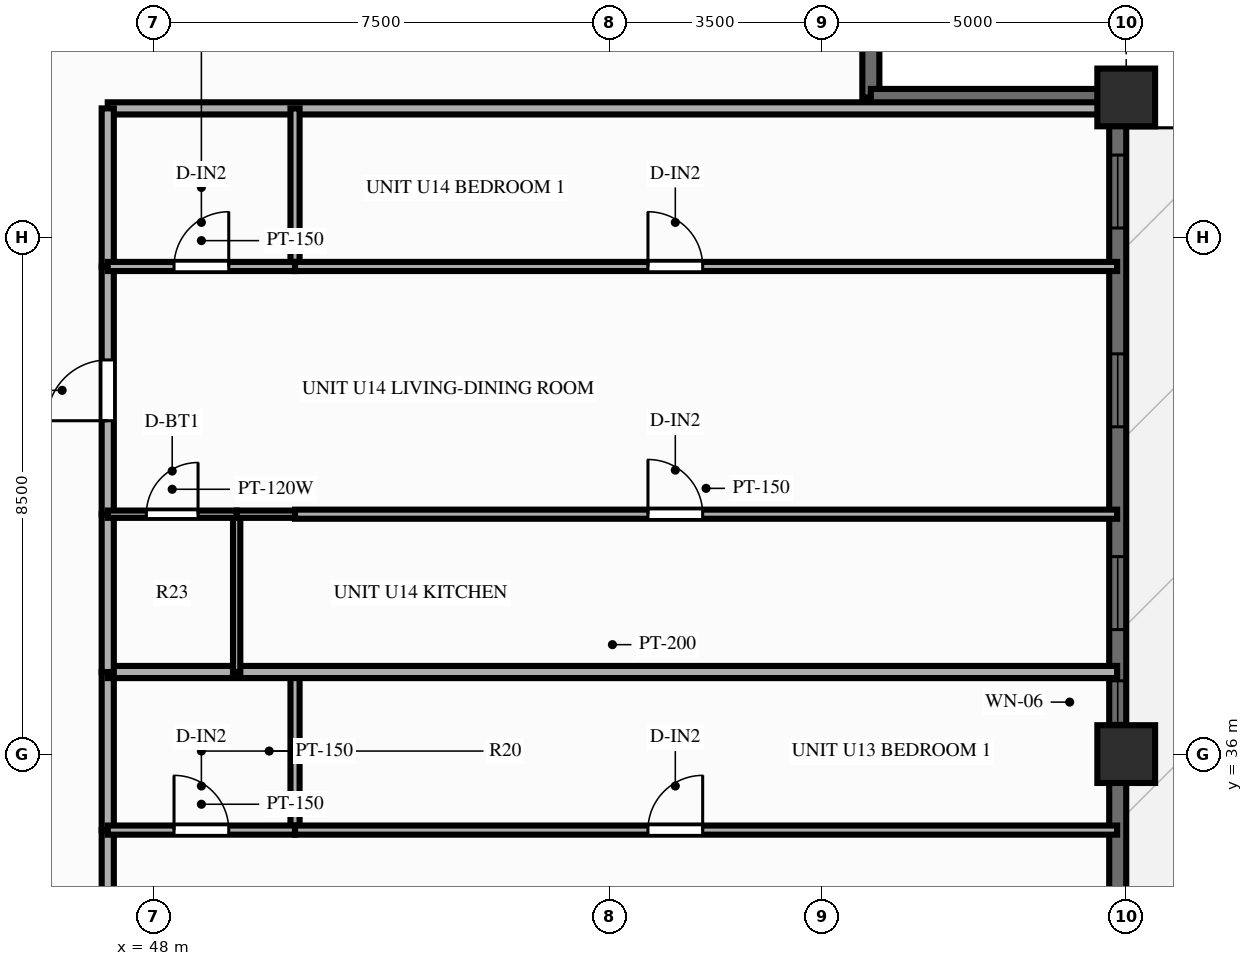
"""IFC4 building model, lengths in metres.
Left out: names, types, materials, properties, quantities, classifications, styles, units other than length and angle.
Written with IfcOpenShell. Run it as: python <this file> out.ifc"""

import sys

from ifc_helpers import new_model, si_unit, direction, frame, frame_2d, origin, origin_2d, place, context, subcontext, project, spatial, rectangle, extrude, source, transform, mapped, element, fill, save


model = new_model("IFC4")
c1 = context("Model", 3, precision=1e-05, world=origin(), true_north=direction((0.0, 1.0)))
c2 = subcontext(c1, "Body", "Model", "MODEL_VIEW")
j1 = project(units=[si_unit("LENGTHUNIT", "METRE"), si_unit("PLANEANGLEUNIT", "RADIAN")], contexts=[c1])
p1 = place(None, origin())
s1 = spatial("IfcSite", under=j1, at=p1, CompositionType="ELEMENT")
p2 = place(p1, origin())
s2 = spatial("IfcBuilding", under=s1, at=p2, CompositionType="ELEMENT")
p3 = place(p2, frame((0.0, 0.0, 119.85)))
s3 = spatial("IfcBuildingStorey", under=s2, at=p3, CompositionType="ELEMENT", Elevation=119.85)
m1 = source(origin(), c2, "Body", "SweptSolid", [
    extrude(rectangle(XDim=0.95, YDim=0.95, at=origin_2d()), origin(), (0.0, 0.0, 1.0), 3.0),
])
for number, where, z_axis, x_axis in (
    (1, (64.0, 36.0, 0.0), (0.0, 0.0, 1.0), (1.0, 0.0, 0.0)),
    (2, (64.0, 46.8, 0.0), (0.0, 0.0, 1.0), (1.0, 0.0, 0.0)),
):
    element("IfcColumn", number, at=place(p3, frame(where, z_axis=z_axis, x_axis=x_axis)), inside=s3, PredefinedType="COLUMN", context=c2, shape_type="MappedRepresentation", body=[
        mapped(m1, transform((0.0, 0.0, 0.0), scale=1.0)),
    ])
p4 = place(p3, frame((63.86, 7.2, 0.0), z_axis=(0.0, 0.0, 1.0), x_axis=(0.0, 1.0, 0.0)))
e3 = element("IfcWall", 3, at=p4, inside=s3, PredefinedType="SOLIDWALL", context=c2, shape_type="SweptSolid", body=[
    extrude(rectangle(XDim=39.6, YDim=0.28, at=frame_2d((19.8, 0.0))), origin(), (0.0, 0.0, 1.0), 2.28),
])
p5 = place(p4, frame((1.56, 0.0, 0.25)))
e4 = element("IfcOpeningElement", 4, at=p5, cuts=e3, PredefinedType="OPENING", context=c2, shape_type="SweptSolid", body=[
    extrude(rectangle(XDim=1.2, YDim=1.5, at=frame_2d((0.6, 0.75))), frame((0.0, 0.152, 0.0), z_axis=(0.0, -1.0, 0.0), x_axis=(1.0, 0.0, 0.0)), (0.0, 0.0, 1.0), 0.304),
])
p6 = place(p4, frame((4.829, 0.0, 0.25)))
e5 = element("IfcOpeningElement", 5, at=p6, cuts=e3, PredefinedType="OPENING", context=c2, shape_type="SweptSolid", body=[
    extrude(rectangle(XDim=1.2, YDim=1.5, at=frame_2d((0.6, 0.75))), frame((0.0, 0.152, 0.0), z_axis=(0.0, -1.0, 0.0), x_axis=(1.0, 0.0, 0.0)), (0.0, 0.0, 1.0), 0.304),
])
p7 = place(p4, frame((7.567, 0.0, 0.25)))
e6 = element("IfcOpeningElement", 6, at=p7, cuts=e3, PredefinedType="OPENING", context=c2, shape_type="SweptSolid", body=[
    extrude(rectangle(XDim=1.2, YDim=1.5, at=frame_2d((0.6, 0.75))), frame((0.0, 0.152, 0.0), z_axis=(0.0, -1.0, 0.0), x_axis=(1.0, 0.0, 0.0)), (0.0, 0.0, 1.0), 0.304),
])
p8 = place(p4, frame((11.476, 0.0, 0.25)))
e7 = element("IfcOpeningElement", 7, at=p8, cuts=e3, PredefinedType="OPENING", context=c2, shape_type="SweptSolid", body=[
    extrude(rectangle(XDim=0.95, YDim=1.5, at=frame_2d((0.475, 0.75))), frame((0.0, 0.152, 0.0), z_axis=(0.0, -1.0, 0.0), x_axis=(1.0, 0.0, 0.0)), (0.0, 0.0, 1.0), 0.304),
])
p9 = place(p4, frame((13.552, 0.0, 0.25)))
e8 = element("IfcOpeningElement", 8, at=p9, cuts=e3, PredefinedType="OPENING", context=c2, shape_type="SweptSolid", body=[
    extrude(rectangle(XDim=1.2, YDim=1.5, at=frame_2d((0.6, 0.75))), frame((0.0, 0.152, 0.0), z_axis=(0.0, -1.0, 0.0), x_axis=(1.0, 0.0, 0.0)), (0.0, 0.0, 1.0), 0.304),
])
p10 = place(p4, frame((16.518, 0.0, 0.25)))
e9 = element("IfcOpeningElement", 9, at=p10, cuts=e3, PredefinedType="OPENING", context=c2, shape_type="SweptSolid", body=[
    extrude(rectangle(XDim=1.2, YDim=1.5, at=frame_2d((0.6, 0.75))), frame((0.0, 0.152, 0.0), z_axis=(0.0, -1.0, 0.0), x_axis=(1.0, 0.0, 0.0)), (0.0, 0.0, 1.0), 0.304),
])
p11 = place(p4, frame((19.2, 0.0, 0.25)))
e10 = element("IfcOpeningElement", 10, at=p11, cuts=e3, PredefinedType="OPENING", context=c2, shape_type="SweptSolid", body=[
    extrude(rectangle(XDim=1.2, YDim=1.5, at=frame_2d((0.6, 0.75))), frame((0.0, 0.152, 0.0), z_axis=(0.0, -1.0, 0.0), x_axis=(1.0, 0.0, 0.0)), (0.0, 0.0, 1.0), 0.304),
])
p12 = place(p4, frame((21.578, 0.0, 0.25)))
e11 = element("IfcOpeningElement", 11, at=p12, cuts=e3, PredefinedType="OPENING", context=c2, shape_type="SweptSolid", body=[
    extrude(rectangle(XDim=1.2, YDim=1.5, at=frame_2d((0.6, 0.75))), frame((0.0, 0.152, 0.0), z_axis=(0.0, -1.0, 0.0), x_axis=(1.0, 0.0, 0.0)), (0.0, 0.0, 1.0), 0.304),
])
p13 = place(p4, frame((26.313, 0.0, 0.0), z_axis=(0.0, 0.0, 1.0), x_axis=(-1.0, 0.0, 0.0)))
e12 = element("IfcOpeningElement", 12, at=p13, cuts=e3, PredefinedType="OPENING", context=c2, shape_type="SweptSolid", body=[
    extrude(rectangle(XDim=1.6, YDim=2.15, at=frame_2d((0.8, 1.075))), frame((0.0, 0.152, 0.0), z_axis=(0.0, -1.0, 0.0), x_axis=(1.0, 0.0, 0.0)), (0.0, 0.0, 1.0), 0.304),
])
p14 = place(p4, frame((29.305, 0.0, 0.25)))
e13 = element("IfcOpeningElement", 13, at=p14, cuts=e3, PredefinedType="OPENING", context=c2, shape_type="SweptSolid", body=[
    extrude(rectangle(XDim=0.7, YDim=1.5, at=frame_2d((0.35, 0.75))), frame((0.0, 0.152, 0.0), z_axis=(0.0, -1.0, 0.0), x_axis=(1.0, 0.0, 0.0)), (0.0, 0.0, 1.0), 0.304),
])
p15 = place(p4, frame((30.848, 0.0, 0.25)))
e14 = element("IfcOpeningElement", 14, at=p15, cuts=e3, PredefinedType="OPENING", context=c2, shape_type="SweptSolid", body=[
    extrude(rectangle(XDim=1.2, YDim=1.5, at=frame_2d((0.6, 0.75))), frame((0.0, 0.152, 0.0), z_axis=(0.0, -1.0, 0.0), x_axis=(1.0, 0.0, 0.0)), (0.0, 0.0, 1.0), 0.304),
])
p16 = place(p4, frame((34.183, 0.0, 0.25)))
e15 = element("IfcOpeningElement", 15, at=p16, cuts=e3, PredefinedType="OPENING", context=c2, shape_type="SweptSolid", body=[
    extrude(rectangle(XDim=1.2, YDim=1.5, at=frame_2d((0.6, 0.75))), frame((0.0, 0.152, 0.0), z_axis=(0.0, -1.0, 0.0), x_axis=(1.0, 0.0, 0.0)), (0.0, 0.0, 1.0), 0.304),
])
p17 = place(p4, frame((37.452, 0.0, 0.25)))
e16 = element("IfcOpeningElement", 16, at=p17, cuts=e3, PredefinedType="OPENING", context=c2, shape_type="SweptSolid", body=[
    extrude(rectangle(XDim=1.2, YDim=1.5, at=frame_2d((0.6, 0.75))), frame((0.0, 0.152, 0.0), z_axis=(0.0, -1.0, 0.0), x_axis=(1.0, 0.0, 0.0)), (0.0, 0.0, 1.0), 0.304),
])
for number, where, z_axis, x_axis in (
    (17, (59.8, 46.8, 0.0), (0.0, 0.0, 1.0), (0.0, 1.0, 0.0)),
    (18, (59.8, 46.8, 0.0), (0.0, 0.0, 1.0), (1.0, 0.0, 0.0)),
):
    element("IfcWall", number, at=place(p3, frame(where, z_axis=z_axis, x_axis=x_axis)), inside=s3, PredefinedType="SOLIDWALL", context=c2, shape_type="SweptSolid", body=[
        extrude(rectangle(XDim=4.12, YDim=0.28, at=frame_2d((2.06, 0.0))), origin(), (0.0, 0.0, 1.0), 2.28),
    ])
p18 = place(p3, frame((47.25, 46.62, 0.0), z_axis=(0.0, 0.0, 1.0), x_axis=(1.0, 0.0, 0.0)))
e19 = element("IfcWall", 19, at=p18, inside=s3, PredefinedType="PARTITIONING", context=c2, shape_type="SweptSolid", body=[
    extrude(rectangle(XDim=16.6, YDim=0.2, at=frame_2d((8.3, 0.0))), origin(), (0.0, 0.0, 1.0), 2.79),
])
p19 = place(p3, frame((47.25, 30.676, 0.0), z_axis=(0.0, 0.0, 1.0), x_axis=(0.0, 1.0, 0.0)))
e20 = element("IfcWall", 20, at=p19, inside=s3, PredefinedType="PARTITIONING", context=c2, shape_type="SweptSolid", body=[
    extrude(rectangle(XDim=4.074, YDim=0.2, at=frame_2d((2.037, 0.0))), origin(), (0.0, 0.0, 1.0), 2.79),
])
p20 = place(p19, frame((1.537, 0.0, 0.0)))
e21 = element("IfcOpeningElement", 21, at=p20, cuts=e20, PredefinedType="OPENING", context=c2, shape_type="SweptSolid", body=[
    extrude(rectangle(XDim=1.0, YDim=2.15, at=frame_2d((0.5, 1.075))), frame((0.0, 0.112, 0.0), z_axis=(0.0, -1.0, 0.0), x_axis=(1.0, 0.0, 0.0)), (0.0, 0.0, 1.0), 0.224),
])
p21 = place(p3, frame((47.25, 34.75, 0.0), z_axis=(0.0, 0.0, 1.0), x_axis=(0.0, 1.0, 0.0)))
e22 = element("IfcWall", 22, at=p21, inside=s3, PredefinedType="PARTITIONING", context=c2, shape_type="SweptSolid", body=[
    extrude(rectangle(XDim=2.6, YDim=0.2, at=frame_2d((1.3, 0.0))), origin(), (0.0, 0.0, 1.0), 2.79),
])
p22 = place(p3, frame((50.33, 34.75, 0.0), z_axis=(0.0, 0.0, 1.0), x_axis=(0.0, 1.0, 0.0)))
e23 = element("IfcWall", 23, at=p22, inside=s3, PredefinedType="PARTITIONING", context=c2, shape_type="SweptSolid", body=[
    extrude(rectangle(XDim=2.6, YDim=0.15, at=frame_2d((1.3, 0.0))), origin(), (0.0, 0.0, 1.0), 2.79),
])
p23 = place(p3, frame((47.25, 34.75, 0.0), z_axis=(0.0, 0.0, 1.0), x_axis=(1.0, 0.0, 0.0)))
e24 = element("IfcWall", 24, at=p23, inside=s3, PredefinedType="PARTITIONING", context=c2, shape_type="SweptSolid", body=[
    extrude(rectangle(XDim=3.08, YDim=0.15, at=frame_2d((1.54, 0.0))), origin(), (0.0, 0.0, 1.0), 2.79),
])
p24 = place(p23, frame((1.09, 0.0, 0.0)))
e25 = element("IfcOpeningElement", 25, at=p24, cuts=e24, PredefinedType="OPENING", context=c2, shape_type="SweptSolid", body=[
    extrude(rectangle(XDim=0.9, YDim=2.1, at=frame_2d((0.45, 1.05))), frame((0.0, 0.087, 0.0), z_axis=(0.0, -1.0, 0.0), x_axis=(1.0, 0.0, 0.0)), (0.0, 0.0, 1.0), 0.174),
])
p25 = place(p3, frame((50.33, 34.75, 0.0), z_axis=(0.0, 0.0, 1.0), x_axis=(1.0, 0.0, 0.0)))
e26 = element("IfcWall", 26, at=p25, inside=s3, PredefinedType="PARTITIONING", context=c2, shape_type="SweptSolid", body=[
    extrude(rectangle(XDim=13.52, YDim=0.15, at=frame_2d((6.76, 0.0))), origin(), (0.0, 0.0, 1.0), 2.79),
])
p26 = place(p25, frame((5.804, 0.0, 0.0)))
e27 = element("IfcOpeningElement", 27, at=p26, cuts=e26, PredefinedType="OPENING", context=c2, shape_type="SweptSolid", body=[
    extrude(rectangle(XDim=0.9, YDim=2.1, at=frame_2d((0.45, 1.05))), frame((0.0, 0.087, 0.0), z_axis=(0.0, -1.0, 0.0), x_axis=(1.0, 0.0, 0.0)), (0.0, 0.0, 1.0), 0.174),
])
p27 = place(p3, frame((47.25, 37.35, 0.0), z_axis=(0.0, 0.0, 1.0), x_axis=(1.0, 0.0, 0.0)))
e28 = element("IfcWall", 28, at=p27, inside=s3, PredefinedType="PARTITIONING", context=c2, shape_type="SweptSolid", body=[
    extrude(rectangle(XDim=16.6, YDim=0.2, at=frame_2d((8.3, 0.0))), origin(), (0.0, 0.0, 1.0), 2.79),
])
p28 = place(p3, frame((47.25, 37.35, 0.0), z_axis=(0.0, 0.0, 1.0), x_axis=(0.0, 1.0, 0.0)))
e29 = element("IfcWall", 29, at=p28, inside=s3, PredefinedType="PARTITIONING", context=c2, shape_type="SweptSolid", body=[
    extrude(rectangle(XDim=2.595, YDim=0.2, at=frame_2d((1.298, 0.0))), origin(), (0.0, 0.0, 1.0), 2.79),
])
p29 = place(p3, frame((47.25, 39.946, 0.0), z_axis=(0.0, 0.0, 1.0), x_axis=(0.0, 1.0, 0.0)))
e30 = element("IfcWall", 30, at=p29, inside=s3, PredefinedType="PARTITIONING", context=c2, shape_type="SweptSolid", body=[
    extrude(rectangle(XDim=4.074, YDim=0.2, at=frame_2d((2.037, 0.0))), origin(), (0.0, 0.0, 1.0), 2.79),
])
p30 = place(p29, frame((1.537, 0.0, 0.0)))
e31 = element("IfcOpeningElement", 31, at=p30, cuts=e30, PredefinedType="OPENING", context=c2, shape_type="SweptSolid", body=[
    extrude(rectangle(XDim=1.0, YDim=2.15, at=frame_2d((0.5, 1.075))), frame((0.0, 0.112, 0.0), z_axis=(0.0, -1.0, 0.0), x_axis=(1.0, 0.0, 0.0)), (0.0, 0.0, 1.0), 0.224),
])
p31 = place(p3, frame((47.25, 44.02, 0.0), z_axis=(0.0, 0.0, 1.0), x_axis=(0.0, 1.0, 0.0)))
e32 = element("IfcWall", 32, at=p31, inside=s3, PredefinedType="PARTITIONING", context=c2, shape_type="SweptSolid", body=[
    extrude(rectangle(XDim=2.6, YDim=0.2, at=frame_2d((1.3, 0.0))), origin(), (0.0, 0.0, 1.0), 2.79),
])
p32 = place(p3, frame((49.37, 37.35, 0.0), z_axis=(0.0, 0.0, 1.0), x_axis=(0.0, 1.0, 0.0)))
e33 = element("IfcWall", 33, at=p32, inside=s3, PredefinedType="PARTITIONING", context=c2, shape_type="SweptSolid", body=[
    extrude(rectangle(XDim=2.595, YDim=0.12, at=frame_2d((1.298, 0.0))), origin(), (0.0, 0.0, 1.0), 2.79),
])
p33 = place(p3, frame((50.33, 44.02, 0.0), z_axis=(0.0, 0.0, 1.0), x_axis=(0.0, 1.0, 0.0)))
e34 = element("IfcWall", 34, at=p33, inside=s3, PredefinedType="PARTITIONING", context=c2, shape_type="SweptSolid", body=[
    extrude(rectangle(XDim=2.6, YDim=0.15, at=frame_2d((1.3, 0.0))), origin(), (0.0, 0.0, 1.0), 2.79),
])
p34 = place(p3, frame((47.25, 39.946, 0.0), z_axis=(0.0, 0.0, 1.0), x_axis=(1.0, 0.0, 0.0)))
e35 = element("IfcWall", 35, at=p34, inside=s3, PredefinedType="PARTITIONING", context=c2, shape_type="SweptSolid", body=[
    extrude(rectangle(XDim=2.12, YDim=0.12, at=frame_2d((1.06, 0.0))), origin(), (0.0, 0.0, 1.0), 2.79),
])
p35 = place(p34, frame((0.635, 0.0, 0.0)))
e36 = element("IfcOpeningElement", 36, at=p35, cuts=e35, PredefinedType="OPENING", context=c2, shape_type="SweptSolid", body=[
    extrude(rectangle(XDim=0.85, YDim=2.05, at=frame_2d((0.425, 1.025))), frame((0.0, 0.072, 0.0), z_axis=(0.0, -1.0, 0.0), x_axis=(1.0, 0.0, 0.0)), (0.0, 0.0, 1.0), 0.144),
])
p36 = place(p3, frame((49.37, 39.946, 0.0), z_axis=(0.0, 0.0, 1.0), x_axis=(1.0, 0.0, 0.0)))
e37 = element("IfcWall", 37, at=p36, inside=s3, PredefinedType="PARTITIONING", context=c2, shape_type="SweptSolid", body=[
    extrude(rectangle(XDim=0.96, YDim=0.12, at=frame_2d((0.48, 0.0))), origin(), (0.0, 0.0, 1.0), 2.79),
])
p37 = place(p3, frame((50.33, 39.946, 0.0), z_axis=(0.0, 0.0, 1.0), x_axis=(1.0, 0.0, 0.0)))
e38 = element("IfcWall", 38, at=p37, inside=s3, PredefinedType="PARTITIONING", context=c2, shape_type="SweptSolid", body=[
    extrude(rectangle(XDim=13.52, YDim=0.15, at=frame_2d((6.76, 0.0))), origin(), (0.0, 0.0, 1.0), 2.79),
])
p38 = place(p37, frame((5.804, 0.0, 0.0)))
e39 = element("IfcOpeningElement", 39, at=p38, cuts=e38, PredefinedType="OPENING", context=c2, shape_type="SweptSolid", body=[
    extrude(rectangle(XDim=0.9, YDim=2.1, at=frame_2d((0.45, 1.05))), frame((0.0, 0.087, 0.0), z_axis=(0.0, -1.0, 0.0), x_axis=(1.0, 0.0, 0.0)), (0.0, 0.0, 1.0), 0.174),
])
p39 = place(p3, frame((47.25, 44.02, 0.0), z_axis=(0.0, 0.0, 1.0), x_axis=(1.0, 0.0, 0.0)))
e40 = element("IfcWall", 40, at=p39, inside=s3, PredefinedType="PARTITIONING", context=c2, shape_type="SweptSolid", body=[
    extrude(rectangle(XDim=3.08, YDim=0.15, at=frame_2d((1.54, 0.0))), origin(), (0.0, 0.0, 1.0), 2.79),
])
p40 = place(p39, frame((1.09, 0.0, 0.0)))
e41 = element("IfcOpeningElement", 41, at=p40, cuts=e40, PredefinedType="OPENING", context=c2, shape_type="SweptSolid", body=[
    extrude(rectangle(XDim=0.9, YDim=2.1, at=frame_2d((0.45, 1.05))), frame((0.0, 0.087, 0.0), z_axis=(0.0, -1.0, 0.0), x_axis=(1.0, 0.0, 0.0)), (0.0, 0.0, 1.0), 0.174),
])
p41 = place(p3, frame((50.33, 44.02, 0.0), z_axis=(0.0, 0.0, 1.0), x_axis=(1.0, 0.0, 0.0)))
e42 = element("IfcWall", 42, at=p41, inside=s3, PredefinedType="PARTITIONING", context=c2, shape_type="SweptSolid", body=[
    extrude(rectangle(XDim=13.52, YDim=0.15, at=frame_2d((6.76, 0.0))), origin(), (0.0, 0.0, 1.0), 2.79),
])
p42 = place(p41, frame((5.804, 0.0, 0.0)))
e43 = element("IfcOpeningElement", 43, at=p42, cuts=e42, PredefinedType="OPENING", context=c2, shape_type="SweptSolid", body=[
    extrude(rectangle(XDim=0.9, YDim=2.1, at=frame_2d((0.45, 1.05))), frame((0.0, 0.087, 0.0), z_axis=(0.0, -1.0, 0.0), x_axis=(1.0, 0.0, 0.0)), (0.0, 0.0, 1.0), 0.174),
])
m2 = source(origin(), c2, "Body", "SweptSolid", [
    extrude(rectangle(XDim=0.7, YDim=1.5, at=frame_2d((0.35, 0.75))), frame((0.0, 0.03, 0.0), z_axis=(0.0, -1.0, 0.0), x_axis=(1.0, 0.0, 0.0)), (0.0, 0.0, 1.0), 0.06),
])
p43 = place(p14, origin())
e44 = element("IfcWindow", 44, at=p43, inside=s3, PartitioningType="SINGLE_PANEL", PredefinedType="WINDOW", context=c2, shape_type="MappedRepresentation", body=[
    mapped(m2, transform((0.0, 0.0, 0.0), scale=1.0)),
])
fill(e13, e44)
m3 = source(origin(), c2, "Body", "SweptSolid", [
    extrude(rectangle(XDim=1.2, YDim=1.5, at=frame_2d((0.6, 0.75))), frame((0.0, 0.03, 0.0), z_axis=(0.0, -1.0, 0.0), x_axis=(1.0, 0.0, 0.0)), (0.0, 0.0, 1.0), 0.06),
])
p44 = place(p15, origin())
e45 = element("IfcWindow", 45, at=p44, inside=s3, PartitioningType="SINGLE_PANEL", PredefinedType="WINDOW", context=c2, shape_type="MappedRepresentation", body=[
    mapped(m3, transform((0.0, 0.0, 0.0), scale=1.0)),
])
fill(e14, e45)
p45 = place(p16, origin())
e46 = element("IfcWindow", 46, at=p45, inside=s3, PartitioningType="SINGLE_PANEL", PredefinedType="WINDOW", context=c2, shape_type="MappedRepresentation", body=[
    mapped(m3, transform((0.0, 0.0, 0.0), scale=1.0)),
])
fill(e15, e46)
p46 = place(p17, origin())
e47 = element("IfcWindow", 47, at=p46, inside=s3, PartitioningType="SINGLE_PANEL", PredefinedType="WINDOW", context=c2, shape_type="MappedRepresentation", body=[
    mapped(m3, transform((0.0, 0.0, 0.0), scale=1.0)),
])
fill(e16, e47)
m4 = source(origin(), c2, "Body", "SweptSolid", [
    extrude(rectangle(XDim=0.9, YDim=2.1, at=frame_2d((0.45, 1.05))), frame((0.0, 0.025, 0.0), z_axis=(0.0, -1.0, 0.0), x_axis=(1.0, 0.0, 0.0)), (0.0, 0.0, 1.0), 0.05),
])
p47 = place(p24, origin())
e48 = element("IfcDoor", 48, at=p47, inside=s3, OperationType="SINGLE_SWING_LEFT", PredefinedType="DOOR", context=c2, shape_type="MappedRepresentation", body=[
    mapped(m4, transform((0.0, 0.0, 0.0), scale=1.0)),
])
fill(e25, e48)
p48 = place(p26, origin())
e49 = element("IfcDoor", 49, at=p48, inside=s3, OperationType="SINGLE_SWING_RIGHT", PredefinedType="DOOR", context=c2, shape_type="MappedRepresentation", body=[
    mapped(m4, transform((0.0, 0.0, 0.0), scale=1.0)),
])
fill(e27, e49)
m5 = source(origin(), c2, "Body", "SweptSolid", [
    extrude(rectangle(XDim=1.0, YDim=2.15, at=frame_2d((0.5, 1.075))), frame((0.0, 0.025, 0.0), z_axis=(0.0, -1.0, 0.0), x_axis=(1.0, 0.0, 0.0)), (0.0, 0.0, 1.0), 0.05),
])
p49 = place(p30, origin())
e50 = element("IfcDoor", 50, at=p49, inside=s3, OperationType="SINGLE_SWING_LEFT", PredefinedType="DOOR", context=c2, shape_type="MappedRepresentation", body=[
    mapped(m5, transform((0.0, 0.0, 0.0), scale=1.0)),
])
fill(e31, e50)
m6 = source(origin(), c2, "Body", "SweptSolid", [
    extrude(rectangle(XDim=0.85, YDim=2.05, at=frame_2d((0.425, 1.025))), frame((0.0, 0.025, 0.0), z_axis=(0.0, -1.0, 0.0), x_axis=(1.0, 0.0, 0.0)), (0.0, 0.0, 1.0), 0.05),
])
p50 = place(p35, origin())
e51 = element("IfcDoor", 51, at=p50, inside=s3, OperationType="SINGLE_SWING_RIGHT", PredefinedType="DOOR", context=c2, shape_type="MappedRepresentation", body=[
    mapped(m6, transform((0.0, 0.0, 0.0), scale=1.0)),
])
fill(e36, e51)
p51 = place(p38, origin())
e52 = element("IfcDoor", 52, at=p51, inside=s3, OperationType="SINGLE_SWING_LEFT", PredefinedType="DOOR", context=c2, shape_type="MappedRepresentation", body=[
    mapped(m4, transform((0.0, 0.0, 0.0), scale=1.0)),
])
fill(e39, e52)
p52 = place(p40, origin())
e53 = element("IfcDoor", 53, at=p52, inside=s3, OperationType="SINGLE_SWING_RIGHT", PredefinedType="DOOR", context=c2, shape_type="MappedRepresentation", body=[
    mapped(m4, transform((0.0, 0.0, 0.0), scale=1.0)),
])
fill(e41, e53)
p53 = place(p42, origin())
e54 = element("IfcDoor", 54, at=p53, inside=s3, OperationType="SINGLE_SWING_LEFT", PredefinedType="DOOR", context=c2, shape_type="MappedRepresentation", body=[
    mapped(m4, transform((0.0, 0.0, 0.0), scale=1.0)),
])
fill(e43, e54)
save(model, sys.argv[1])
